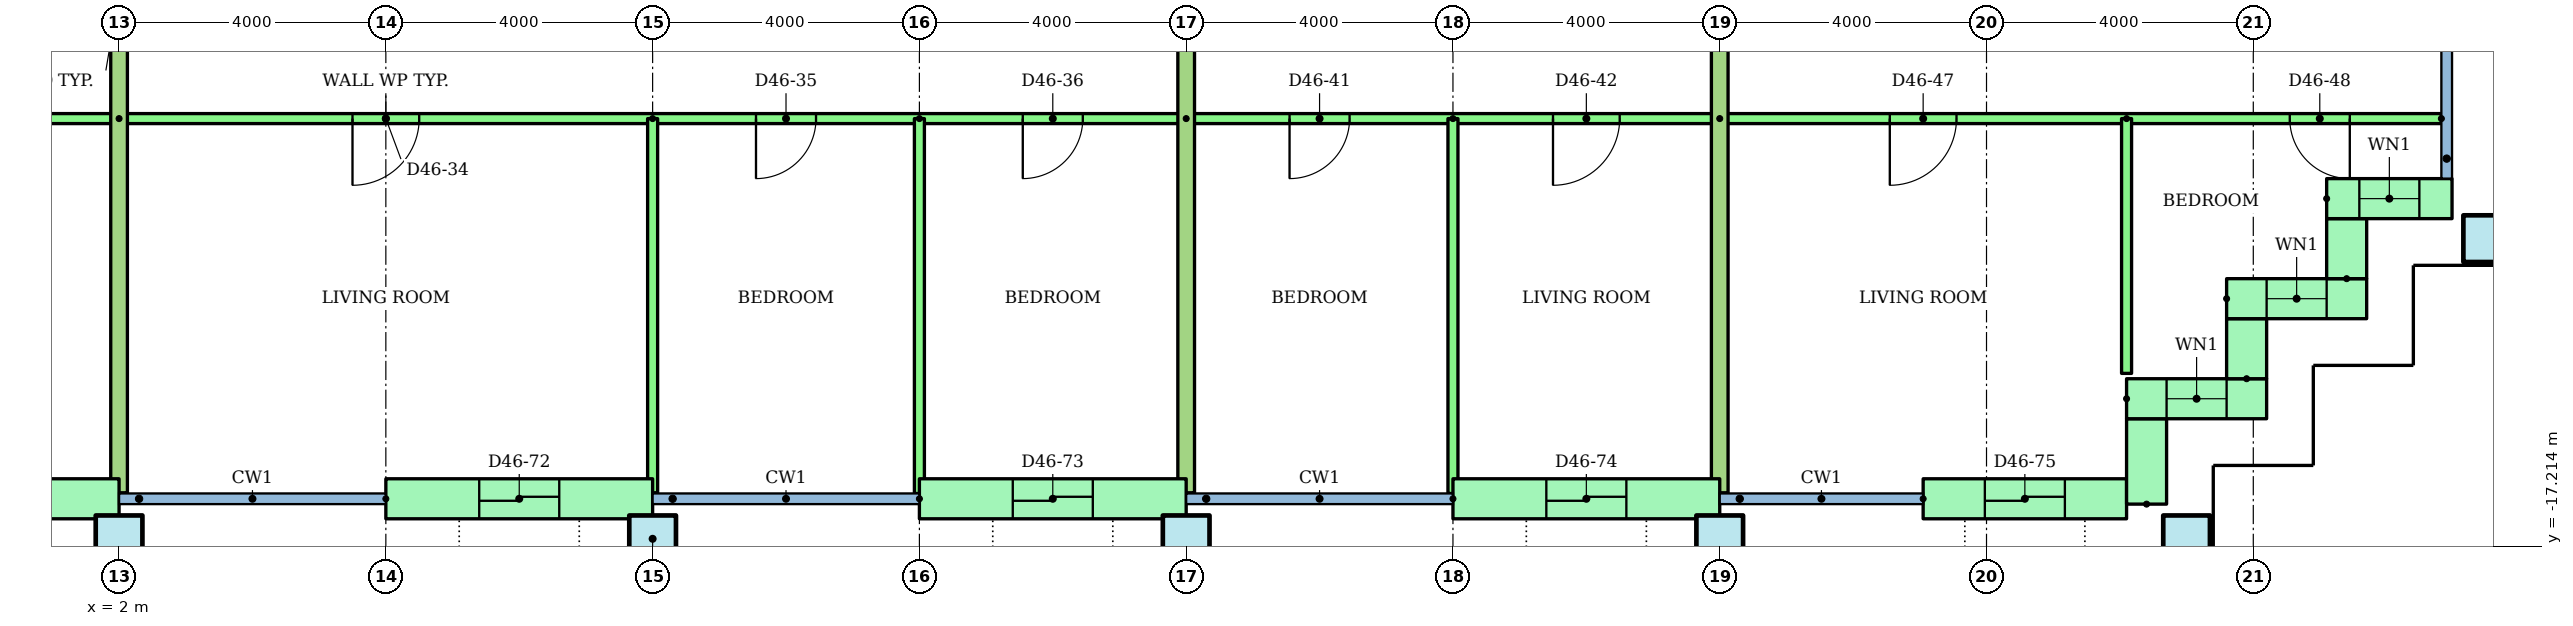
"""IFC4 building model, lengths in metres.
Left out: names, types, materials, properties, quantities, classifications, styles, units other than length and angle.
Written with IfcOpenShell. Run it as: python <this file> out.ifc"""

import sys

from ifc_helpers import new_model, si_unit, direction, frame, frame_2d, origin, origin_2d, place, context, subcontext, project, spatial, rectangle, hollow_rectangle, extrude, element, fill, save


model = new_model("IFC4")
c1 = context("Model", 3, precision=1e-05, world=origin(), true_north=direction((0.0, 1.0)))
c2 = subcontext(c1, "Body", "Model", "MODEL_VIEW")
j1 = project(units=[si_unit("LENGTHUNIT", "METRE"), si_unit("PLANEANGLEUNIT", "RADIAN")], contexts=[c1])
p1 = place(None, origin())
s1 = spatial("IfcSite", under=j1, at=p1, CompositionType="ELEMENT")
p2 = place(p1, origin())
s2 = spatial("IfcBuilding", under=s1, at=p2, CompositionType="ELEMENT")
p3 = place(p2, frame((0.0, 0.0, 178.1)))
s3 = spatial("IfcBuildingStorey", under=s2, at=p3, CompositionType="ELEMENT", Elevation=178.1)
for number, where in (
    (1, (2.0, -17.1, 0.0)),
    (2, (10.0, -17.1, 0.0)),
    (3, (18.0, -17.1, 0.0)),
    (4, (26.0, -17.1, 0.0)),
    (5, (33.0, -17.1, 0.0)),
    (6, (37.5, -12.6, 0.0)),
):
    element("IfcColumn", number, at=place(p3, frame(where)), inside=s3, PredefinedType="COLUMN", context=c2, shape_type="SweptSolid", body=[
        extrude(hollow_rectangle(XDim=0.7, YDim=0.7, WallThickness=0.036, at=origin_2d()), origin(), (0.0, 0.0, 1.0), 3.2),
    ])
p4 = place(p3, frame((-2.0, -16.5, 0.0)))
e7 = element("IfcWall", 7, at=p4, inside=s3, PredefinedType="STANDARD", context=c2, shape_type="SweptSolid", body=[
    extrude(rectangle(XDim=4.0, YDim=0.6, at=frame_2d((2.0, 0.0))), origin(), (0.0, 0.0, 1.0), 2.92),
])
p5 = place(p4, frame((1.4, 0.0, 0.0)))
e8 = element("IfcOpeningElement", 8, at=p5, cuts=e7, PredefinedType="OPENING", context=c2, shape_type="SweptSolid", body=[
    extrude(rectangle(XDim=1.2, YDim=2.1, at=frame_2d((0.6, 1.05))), frame((0.0, 0.31, 0.0), z_axis=(0.0, -1.0, 0.0), x_axis=(1.0, 0.0, 0.0)), (0.0, 0.0, 1.0), 0.62),
])
p6 = place(p3, frame((6.0, -16.5, 0.0)))
e9 = element("IfcWall", 9, at=p6, inside=s3, PredefinedType="STANDARD", context=c2, shape_type="SweptSolid", body=[
    extrude(rectangle(XDim=4.0, YDim=0.6, at=frame_2d((2.0, 0.0))), origin(), (0.0, 0.0, 1.0), 2.92),
])
p7 = place(p6, frame((1.4, 0.0, 0.0)))
e10 = element("IfcOpeningElement", 10, at=p7, cuts=e9, PredefinedType="OPENING", context=c2, shape_type="SweptSolid", body=[
    extrude(rectangle(XDim=1.2, YDim=2.1, at=frame_2d((0.6, 1.05))), frame((0.0, 0.31, 0.0), z_axis=(0.0, -1.0, 0.0), x_axis=(1.0, 0.0, 0.0)), (0.0, 0.0, 1.0), 0.62),
])
p8 = place(p3, frame((14.0, -16.5, 0.0)))
e11 = element("IfcWall", 11, at=p8, inside=s3, PredefinedType="STANDARD", context=c2, shape_type="SweptSolid", body=[
    extrude(rectangle(XDim=4.0, YDim=0.6, at=frame_2d((2.0, 0.0))), origin(), (0.0, 0.0, 1.0), 2.92),
])
p9 = place(p8, frame((1.4, 0.0, 0.0)))
e12 = element("IfcOpeningElement", 12, at=p9, cuts=e11, PredefinedType="OPENING", context=c2, shape_type="SweptSolid", body=[
    extrude(rectangle(XDim=1.2, YDim=2.1, at=frame_2d((0.6, 1.05))), frame((0.0, 0.31, 0.0), z_axis=(0.0, -1.0, 0.0), x_axis=(1.0, 0.0, 0.0)), (0.0, 0.0, 1.0), 0.62),
])
p10 = place(p3, frame((22.0, -16.5, 0.0)))
e13 = element("IfcWall", 13, at=p10, inside=s3, PredefinedType="STANDARD", context=c2, shape_type="SweptSolid", body=[
    extrude(rectangle(XDim=4.0, YDim=0.6, at=frame_2d((2.0, 0.0))), origin(), (0.0, 0.0, 1.0), 2.92),
])
p11 = place(p10, frame((1.4, 0.0, 0.0)))
e14 = element("IfcOpeningElement", 14, at=p11, cuts=e13, PredefinedType="OPENING", context=c2, shape_type="SweptSolid", body=[
    extrude(rectangle(XDim=1.2, YDim=2.1, at=frame_2d((0.6, 1.05))), frame((0.0, 0.31, 0.0), z_axis=(0.0, -1.0, 0.0), x_axis=(1.0, 0.0, 0.0)), (0.0, 0.0, 1.0), 0.62),
])
p12 = place(p3, frame((29.05, -16.5, 0.0)))
e15 = element("IfcWall", 15, at=p12, inside=s3, PredefinedType="STANDARD", context=c2, shape_type="SweptSolid", body=[
    extrude(rectangle(XDim=3.05, YDim=0.6, at=frame_2d((1.525, 0.0))), origin(), (0.0, 0.0, 1.0), 2.92),
])
p13 = place(p12, frame((0.925, 0.0, 0.0)))
e16 = element("IfcOpeningElement", 16, at=p13, cuts=e15, PredefinedType="OPENING", context=c2, shape_type="SweptSolid", body=[
    extrude(rectangle(XDim=1.2, YDim=2.1, at=frame_2d((0.6, 1.05))), frame((0.0, 0.31, 0.0), z_axis=(0.0, -1.0, 0.0), x_axis=(1.0, 0.0, 0.0)), (0.0, 0.0, 1.0), 0.62),
])
p14 = place(p3, frame((32.4, -16.58, 0.0), z_axis=(0.0, 0.0, 1.0), x_axis=(0.0, 1.0, 0.0)))
e17 = element("IfcWall", 17, at=p14, inside=s3, PredefinedType="STANDARD", context=c2, shape_type="SweptSolid", body=[
    extrude(rectangle(XDim=1.28, YDim=0.6, at=frame_2d((0.64, 0.0))), origin(), (0.0, 0.0, 1.0), 2.92),
])
p15 = place(p3, frame((32.1, -15.0, 0.0)))
e18 = element("IfcWall", 18, at=p15, inside=s3, PredefinedType="STANDARD", context=c2, shape_type="SweptSolid", body=[
    extrude(rectangle(XDim=2.1, YDim=0.6, at=frame_2d((1.05, 0.0))), origin(), (0.0, 0.0, 1.0), 2.92),
])
p16 = place(p15, frame((0.6, 0.0, 0.9)))
e19 = element("IfcOpeningElement", 19, at=p16, cuts=e18, PredefinedType="OPENING", context=c2, shape_type="SweptSolid", body=[
    extrude(rectangle(XDim=0.9, YDim=1.5, at=frame_2d((0.45, 0.75))), frame((0.0, 0.31, 0.0), z_axis=(0.0, -1.0, 0.0), x_axis=(1.0, 0.0, 0.0)), (0.0, 0.0, 1.0), 0.62),
])
p17 = place(p3, frame((33.9, -14.7, 0.0), z_axis=(0.0, 0.0, 1.0), x_axis=(0.0, 1.0, 0.0)))
e20 = element("IfcWall", 20, at=p17, inside=s3, PredefinedType="STANDARD", context=c2, shape_type="SweptSolid", body=[
    extrude(rectangle(XDim=0.9, YDim=0.6, at=frame_2d((0.45, 0.0))), origin(), (0.0, 0.0, 1.0), 2.92),
])
p18 = place(p3, frame((33.6, -13.5, 0.0)))
e21 = element("IfcWall", 21, at=p18, inside=s3, PredefinedType="STANDARD", context=c2, shape_type="SweptSolid", body=[
    extrude(rectangle(XDim=2.1, YDim=0.6, at=frame_2d((1.05, 0.0))), origin(), (0.0, 0.0, 1.0), 2.92),
])
p19 = place(p18, frame((0.6, 0.0, 0.9)))
e22 = element("IfcOpeningElement", 22, at=p19, cuts=e21, PredefinedType="OPENING", context=c2, shape_type="SweptSolid", body=[
    extrude(rectangle(XDim=0.9, YDim=1.5, at=frame_2d((0.45, 0.75))), frame((0.0, 0.31, 0.0), z_axis=(0.0, -1.0, 0.0), x_axis=(1.0, 0.0, 0.0)), (0.0, 0.0, 1.0), 0.62),
])
p20 = place(p3, frame((35.4, -13.2, 0.0), z_axis=(0.0, 0.0, 1.0), x_axis=(0.0, 1.0, 0.0)))
e23 = element("IfcWall", 23, at=p20, inside=s3, PredefinedType="STANDARD", context=c2, shape_type="SweptSolid", body=[
    extrude(rectangle(XDim=0.9, YDim=0.6, at=frame_2d((0.45, 0.0))), origin(), (0.0, 0.0, 1.0), 2.92),
])
p21 = place(p3, frame((35.1, -12.0, 0.0)))
e24 = element("IfcWall", 24, at=p21, inside=s3, PredefinedType="STANDARD", context=c2, shape_type="SweptSolid", body=[
    extrude(rectangle(XDim=1.88, YDim=0.6, at=frame_2d((0.94, 0.0))), origin(), (0.0, 0.0, 1.0), 2.92),
])
p22 = place(p21, frame((0.49, 0.0, 0.9)))
e25 = element("IfcOpeningElement", 25, at=p22, cuts=e24, PredefinedType="OPENING", context=c2, shape_type="SweptSolid", body=[
    extrude(rectangle(XDim=0.9, YDim=1.5, at=frame_2d((0.45, 0.75))), frame((0.0, 0.31, 0.0), z_axis=(0.0, -1.0, 0.0), x_axis=(1.0, 0.0, 0.0)), (0.0, 0.0, 1.0), 0.62),
])
p23 = place(p3, frame((2.0, -10.8, 0.0), z_axis=(0.0, 0.0, 1.0), x_axis=(-1.0, 0.0, 0.0)))
e26 = element("IfcWall", 26, at=p23, inside=s3, PredefinedType="PARTITIONING", context=c2, shape_type="SweptSolid", body=[
    extrude(rectangle(XDim=26.82, YDim=0.15, at=frame_2d((13.41, 0.0))), origin(), (0.0, 0.0, 1.0), 2.4),
])
p24 = place(p23, frame((24.547, 0.0, 0.0)))
e27 = element("IfcOpeningElement", 27, at=p24, cuts=e26, PredefinedType="OPENING", context=c2, shape_type="SweptSolid", body=[
    extrude(rectangle(XDim=0.9, YDim=2.1, at=frame_2d((0.45, 1.05))), frame((0.0, 0.085, 0.0), z_axis=(0.0, -1.0, 0.0), x_axis=(1.0, 0.0, 0.0)), (0.0, 0.0, 1.0), 0.17),
])
p25 = place(p23, frame((18.6, 0.0, 0.0)))
e28 = element("IfcOpeningElement", 28, at=p25, cuts=e26, PredefinedType="OPENING", context=c2, shape_type="SweptSolid", body=[
    extrude(rectangle(XDim=0.9, YDim=2.1, at=frame_2d((0.45, 1.05))), frame((0.0, 0.085, 0.0), z_axis=(0.0, -1.0, 0.0), x_axis=(1.0, 0.0, 0.0)), (0.0, 0.0, 1.0), 0.17),
])
p26 = place(p23, frame((11.5, 0.0, 0.0)))
e29 = element("IfcOpeningElement", 29, at=p26, cuts=e26, PredefinedType="OPENING", context=c2, shape_type="SweptSolid", body=[
    extrude(rectangle(XDim=1.0, YDim=2.1, at=frame_2d((0.5, 1.05))), frame((0.0, 0.085, 0.0), z_axis=(0.0, -1.0, 0.0), x_axis=(1.0, 0.0, 0.0)), (0.0, 0.0, 1.0), 0.17),
])
p27 = place(p23, frame((5.55, 0.0, 0.0)))
e30 = element("IfcOpeningElement", 30, at=p27, cuts=e26, PredefinedType="OPENING", context=c2, shape_type="SweptSolid", body=[
    extrude(rectangle(XDim=0.9, YDim=2.1, at=frame_2d((0.45, 1.05))), frame((0.0, 0.085, 0.0), z_axis=(0.0, -1.0, 0.0), x_axis=(1.0, 0.0, 0.0)), (0.0, 0.0, 1.0), 0.17),
])
p28 = place(p23, frame((1.55, 0.0, 0.0)))
e31 = element("IfcOpeningElement", 31, at=p28, cuts=e26, PredefinedType="OPENING", context=c2, shape_type="SweptSolid", body=[
    extrude(rectangle(XDim=0.9, YDim=2.1, at=frame_2d((0.45, 1.05))), frame((0.0, 0.085, 0.0), z_axis=(0.0, -1.0, 0.0), x_axis=(1.0, 0.0, 0.0)), (0.0, 0.0, 1.0), 0.17),
])
p29 = place(p3, frame((18.0, -10.8, 0.0), z_axis=(0.0, 0.0, 1.0), x_axis=(-1.0, 0.0, 0.0)))
e32 = element("IfcWall", 32, at=p29, inside=s3, PredefinedType="PARTITIONING", context=c2, shape_type="SweptSolid", body=[
    extrude(rectangle(XDim=16.0, YDim=0.15, at=frame_2d((8.0, 0.0))), origin(), (0.0, 0.0, 1.0), 2.4),
])
p30 = place(p29, frame((11.5, 0.0, 0.0)))
e33 = element("IfcOpeningElement", 33, at=p30, cuts=e32, PredefinedType="OPENING", context=c2, shape_type="SweptSolid", body=[
    extrude(rectangle(XDim=1.0, YDim=2.1, at=frame_2d((0.5, 1.05))), frame((0.0, 0.085, 0.0), z_axis=(0.0, -1.0, 0.0), x_axis=(1.0, 0.0, 0.0)), (0.0, 0.0, 1.0), 0.17),
])
p31 = place(p29, frame((5.55, 0.0, 0.0)))
e34 = element("IfcOpeningElement", 34, at=p31, cuts=e32, PredefinedType="OPENING", context=c2, shape_type="SweptSolid", body=[
    extrude(rectangle(XDim=0.9, YDim=2.1, at=frame_2d((0.45, 1.05))), frame((0.0, 0.085, 0.0), z_axis=(0.0, -1.0, 0.0), x_axis=(1.0, 0.0, 0.0)), (0.0, 0.0, 1.0), 0.17),
])
p32 = place(p29, frame((1.55, 0.0, 0.0)))
e35 = element("IfcOpeningElement", 35, at=p32, cuts=e32, PredefinedType="OPENING", context=c2, shape_type="SweptSolid", body=[
    extrude(rectangle(XDim=0.9, YDim=2.1, at=frame_2d((0.45, 1.05))), frame((0.0, 0.085, 0.0), z_axis=(0.0, -1.0, 0.0), x_axis=(1.0, 0.0, 0.0)), (0.0, 0.0, 1.0), 0.17),
])
p33 = place(p3, frame((10.0, -10.8, 0.0), z_axis=(0.0, 0.0, 1.0), x_axis=(0.0, -1.0, 0.0)))
e36 = element("IfcWall", 36, at=p33, inside=s3, PredefinedType="PARTITIONING", context=c2, shape_type="SweptSolid", body=[
    extrude(rectangle(XDim=5.61, YDim=0.15, at=frame_2d((2.805, 0.0))), origin(), (0.0, 0.0, 1.0), 2.4),
])
p34 = place(p3, frame((14.0, -10.8, 0.0), z_axis=(0.0, 0.0, 1.0), x_axis=(0.0, -1.0, 0.0)))
e37 = element("IfcWall", 37, at=p34, inside=s3, PredefinedType="PARTITIONING", context=c2, shape_type="SweptSolid", body=[
    extrude(rectangle(XDim=5.621, YDim=0.15, at=frame_2d((2.811, 0.0))), origin(), (0.0, 0.0, 1.0), 2.4),
])
p35 = place(p3, frame((2.0, -1.4, 0.0), z_axis=(0.0, 0.0, 1.0), x_axis=(0.0, -1.0, 0.0)))
e38 = element("IfcWall", 38, at=p35, inside=s3, PredefinedType="PARTITIONING", context=c2, shape_type="SweptSolid", body=[
    extrude(rectangle(XDim=15.01, YDim=0.25, at=frame_2d((7.505, 0.0))), origin(), (0.0, 0.0, 1.0), 2.4),
])
p36 = place(p3, frame((26.0, -10.8, 0.0), z_axis=(0.0, 0.0, 1.0), x_axis=(-1.0, 0.0, 0.0)))
e39 = element("IfcWall", 39, at=p36, inside=s3, PredefinedType="PARTITIONING", context=c2, shape_type="SweptSolid", body=[
    extrude(rectangle(XDim=8.0, YDim=0.15, at=frame_2d((4.0, 0.0))), origin(), (0.0, 0.0, 1.0), 2.4),
])
p37 = place(p36, frame((5.55, 0.0, 0.0)))
e40 = element("IfcOpeningElement", 40, at=p37, cuts=e39, PredefinedType="OPENING", context=c2, shape_type="SweptSolid", body=[
    extrude(rectangle(XDim=0.9, YDim=2.1, at=frame_2d((0.45, 1.05))), frame((0.0, 0.085, 0.0), z_axis=(0.0, -1.0, 0.0), x_axis=(1.0, 0.0, 0.0)), (0.0, 0.0, 1.0), 0.17),
])
p38 = place(p36, frame((1.5, 0.0, 0.0)))
e41 = element("IfcOpeningElement", 41, at=p38, cuts=e39, PredefinedType="OPENING", context=c2, shape_type="SweptSolid", body=[
    extrude(rectangle(XDim=1.0, YDim=2.1, at=frame_2d((0.5, 1.05))), frame((0.0, 0.085, 0.0), z_axis=(0.0, -1.0, 0.0), x_axis=(1.0, 0.0, 0.0)), (0.0, 0.0, 1.0), 0.17),
])
p39 = place(p3, frame((22.0, -10.8, 0.0), z_axis=(0.0, 0.0, 1.0), x_axis=(0.0, -1.0, 0.0)))
e42 = element("IfcWall", 42, at=p39, inside=s3, PredefinedType="PARTITIONING", context=c2, shape_type="SweptSolid", body=[
    extrude(rectangle(XDim=5.621, YDim=0.15, at=frame_2d((2.811, 0.0))), origin(), (0.0, 0.0, 1.0), 2.4),
])
p40 = place(p3, frame((18.0, -1.4, 0.0), z_axis=(0.0, 0.0, 1.0), x_axis=(0.0, -1.0, 0.0)))
e43 = element("IfcWall", 43, at=p40, inside=s3, PredefinedType="PARTITIONING", context=c2, shape_type="SweptSolid", body=[
    extrude(rectangle(XDim=15.01, YDim=0.25, at=frame_2d((7.505, 0.0))), origin(), (0.0, 0.0, 1.0), 2.4),
])
p41 = place(p3, frame((36.82, -10.8, 0.0), z_axis=(0.0, 0.0, 1.0), x_axis=(-1.0, 0.0, 0.0)))
e44 = element("IfcWall", 44, at=p41, inside=s3, PredefinedType="PARTITIONING", context=c2, shape_type="SweptSolid", body=[
    extrude(rectangle(XDim=10.82, YDim=0.15, at=frame_2d((5.41, 0.0))), origin(), (0.0, 0.0, 1.0), 2.4),
])
p42 = place(p41, frame((7.27, 0.0, 0.0)))
e45 = element("IfcOpeningElement", 45, at=p42, cuts=e44, PredefinedType="OPENING", context=c2, shape_type="SweptSolid", body=[
    extrude(rectangle(XDim=1.0, YDim=2.1, at=frame_2d((0.5, 1.05))), frame((0.0, 0.085, 0.0), z_axis=(0.0, -1.0, 0.0), x_axis=(1.0, 0.0, 0.0)), (0.0, 0.0, 1.0), 0.17),
])
p43 = place(p41, frame((1.373, 0.0, 0.0)))
e46 = element("IfcOpeningElement", 46, at=p43, cuts=e44, PredefinedType="OPENING", context=c2, shape_type="SweptSolid", body=[
    extrude(rectangle(XDim=0.9, YDim=2.1, at=frame_2d((0.45, 1.05))), frame((0.0, 0.085, 0.0), z_axis=(0.0, -1.0, 0.0), x_axis=(1.0, 0.0, 0.0)), (0.0, 0.0, 1.0), 0.17),
])
p44 = place(p3, frame((32.1, -10.8, 0.0), z_axis=(0.0, 0.0, 1.0), x_axis=(0.0, -1.0, 0.0)))
e47 = element("IfcWall", 47, at=p44, inside=s3, PredefinedType="PARTITIONING", context=c2, shape_type="SweptSolid", body=[
    extrude(rectangle(XDim=3.82, YDim=0.15, at=frame_2d((1.91, 0.0))), origin(), (0.0, 0.0, 1.0), 2.4),
])
p45 = place(p3, frame((26.0, -1.4, 0.0), z_axis=(0.0, 0.0, 1.0), x_axis=(0.0, -1.0, 0.0)))
e48 = element("IfcWall", 48, at=p45, inside=s3, PredefinedType="PARTITIONING", context=c2, shape_type="SweptSolid", body=[
    extrude(rectangle(XDim=15.01, YDim=0.25, at=frame_2d((7.505, 0.0))), origin(), (0.0, 0.0, 1.0), 2.4),
])
p46 = place(p16, origin())
e49 = element("IfcWindow", 49, at=p46, inside=s3, PartitioningType="SINGLE_PANEL", PredefinedType="WINDOW", context=c2, shape_type="SweptSolid", body=[
    extrude(rectangle(XDim=0.9, YDim=1.5, at=frame_2d((0.45, 0.75))), frame((0.0, 0.03, 0.0), z_axis=(0.0, -1.0, 0.0), x_axis=(1.0, 0.0, 0.0)), (0.0, 0.0, 1.0), 0.06),
])
fill(e19, e49)
p47 = place(p19, origin())
e50 = element("IfcWindow", 50, at=p47, inside=s3, PartitioningType="SINGLE_PANEL", PredefinedType="WINDOW", context=c2, shape_type="SweptSolid", body=[
    extrude(rectangle(XDim=0.9, YDim=1.5, at=frame_2d((0.45, 0.75))), frame((0.0, 0.03, 0.0), z_axis=(0.0, -1.0, 0.0), x_axis=(1.0, 0.0, 0.0)), (0.0, 0.0, 1.0), 0.06),
])
fill(e22, e50)
p48 = place(p22, origin())
e51 = element("IfcWindow", 51, at=p48, inside=s3, PartitioningType="SINGLE_PANEL", PredefinedType="WINDOW", context=c2, shape_type="SweptSolid", body=[
    extrude(rectangle(XDim=0.9, YDim=1.5, at=frame_2d((0.45, 0.75))), frame((0.0, 0.03, 0.0), z_axis=(0.0, -1.0, 0.0), x_axis=(1.0, 0.0, 0.0)), (0.0, 0.0, 1.0), 0.06),
])
fill(e25, e51)
p49 = place(p30, origin())
e52 = element("IfcDoor", 52, at=p49, inside=s3, OperationType="SINGLE_SWING_RIGHT", PredefinedType="DOOR", context=c2, shape_type="SweptSolid", body=[
    extrude(rectangle(XDim=1.0, YDim=2.1, at=frame_2d((0.5, 1.05))), frame((0.0, 0.025, 0.0), z_axis=(0.0, -1.0, 0.0), x_axis=(1.0, 0.0, 0.0)), (0.0, 0.0, 1.0), 0.05),
])
fill(e33, e52)
p50 = place(p31, origin())
e53 = element("IfcDoor", 53, at=p50, inside=s3, OperationType="SINGLE_SWING_RIGHT", PredefinedType="DOOR", context=c2, shape_type="SweptSolid", body=[
    extrude(rectangle(XDim=0.9, YDim=2.1, at=frame_2d((0.45, 1.05))), frame((0.0, 0.025, 0.0), z_axis=(0.0, -1.0, 0.0), x_axis=(1.0, 0.0, 0.0)), (0.0, 0.0, 1.0), 0.05),
])
fill(e34, e53)
p51 = place(p32, origin())
e54 = element("IfcDoor", 54, at=p51, inside=s3, OperationType="SINGLE_SWING_RIGHT", PredefinedType="DOOR", context=c2, shape_type="SweptSolid", body=[
    extrude(rectangle(XDim=0.9, YDim=2.1, at=frame_2d((0.45, 1.05))), frame((0.0, 0.025, 0.0), z_axis=(0.0, -1.0, 0.0), x_axis=(1.0, 0.0, 0.0)), (0.0, 0.0, 1.0), 0.05),
])
fill(e35, e54)
p52 = place(p37, origin())
e55 = element("IfcDoor", 55, at=p52, inside=s3, OperationType="SINGLE_SWING_RIGHT", PredefinedType="DOOR", context=c2, shape_type="SweptSolid", body=[
    extrude(rectangle(XDim=0.9, YDim=2.1, at=frame_2d((0.45, 1.05))), frame((0.0, 0.025, 0.0), z_axis=(0.0, -1.0, 0.0), x_axis=(1.0, 0.0, 0.0)), (0.0, 0.0, 1.0), 0.05),
])
fill(e40, e55)
p53 = place(p38, origin())
e56 = element("IfcDoor", 56, at=p53, inside=s3, OperationType="SINGLE_SWING_RIGHT", PredefinedType="DOOR", context=c2, shape_type="SweptSolid", body=[
    extrude(rectangle(XDim=1.0, YDim=2.1, at=frame_2d((0.5, 1.05))), frame((0.0, 0.025, 0.0), z_axis=(0.0, -1.0, 0.0), x_axis=(1.0, 0.0, 0.0)), (0.0, 0.0, 1.0), 0.05),
])
fill(e41, e56)
p54 = place(p42, origin())
e57 = element("IfcDoor", 57, at=p54, inside=s3, OperationType="SINGLE_SWING_RIGHT", PredefinedType="DOOR", context=c2, shape_type="SweptSolid", body=[
    extrude(rectangle(XDim=1.0, YDim=2.1, at=frame_2d((0.5, 1.05))), frame((0.0, 0.025, 0.0), z_axis=(0.0, -1.0, 0.0), x_axis=(1.0, 0.0, 0.0)), (0.0, 0.0, 1.0), 0.05),
])
fill(e45, e57)
p55 = place(p43, origin())
e58 = element("IfcDoor", 58, at=p55, inside=s3, OperationType="SINGLE_SWING_LEFT", PredefinedType="DOOR", context=c2, shape_type="SweptSolid", body=[
    extrude(rectangle(XDim=0.9, YDim=2.1, at=frame_2d((0.45, 1.05))), frame((0.0, 0.025, 0.0), z_axis=(0.0, -1.0, 0.0), x_axis=(1.0, 0.0, 0.0)), (0.0, 0.0, 1.0), 0.05),
])
fill(e46, e58)
p56 = place(p7, origin())
e59 = element("IfcDoor", 59, at=p56, inside=s3, OperationType="SLIDING_TO_LEFT", PredefinedType="DOOR", context=c2, shape_type="SweptSolid", body=[
    extrude(rectangle(XDim=1.2, YDim=2.1, at=frame_2d((0.6, 1.05))), frame((0.0, 0.025, 0.0), z_axis=(0.0, -1.0, 0.0), x_axis=(1.0, 0.0, 0.0)), (0.0, 0.0, 1.0), 0.05),
])
fill(e10, e59)
p57 = place(p9, origin())
e60 = element("IfcDoor", 60, at=p57, inside=s3, OperationType="SLIDING_TO_LEFT", PredefinedType="DOOR", context=c2, shape_type="SweptSolid", body=[
    extrude(rectangle(XDim=1.2, YDim=2.1, at=frame_2d((0.6, 1.05))), frame((0.0, 0.025, 0.0), z_axis=(0.0, -1.0, 0.0), x_axis=(1.0, 0.0, 0.0)), (0.0, 0.0, 1.0), 0.05),
])
fill(e12, e60)
p58 = place(p11, origin())
e61 = element("IfcDoor", 61, at=p58, inside=s3, OperationType="SLIDING_TO_LEFT", PredefinedType="DOOR", context=c2, shape_type="SweptSolid", body=[
    extrude(rectangle(XDim=1.2, YDim=2.1, at=frame_2d((0.6, 1.05))), frame((0.0, 0.025, 0.0), z_axis=(0.0, -1.0, 0.0), x_axis=(1.0, 0.0, 0.0)), (0.0, 0.0, 1.0), 0.05),
])
fill(e14, e61)
p59 = place(p13, origin())
e62 = element("IfcDoor", 62, at=p59, inside=s3, OperationType="SLIDING_TO_LEFT", PredefinedType="DOOR", context=c2, shape_type="SweptSolid", body=[
    extrude(rectangle(XDim=1.2, YDim=2.1, at=frame_2d((0.6, 1.05))), frame((0.0, 0.025, 0.0), z_axis=(0.0, -1.0, 0.0), x_axis=(1.0, 0.0, 0.0)), (0.0, 0.0, 1.0), 0.05),
])
fill(e16, e62)
save(model, sys.argv[1])
